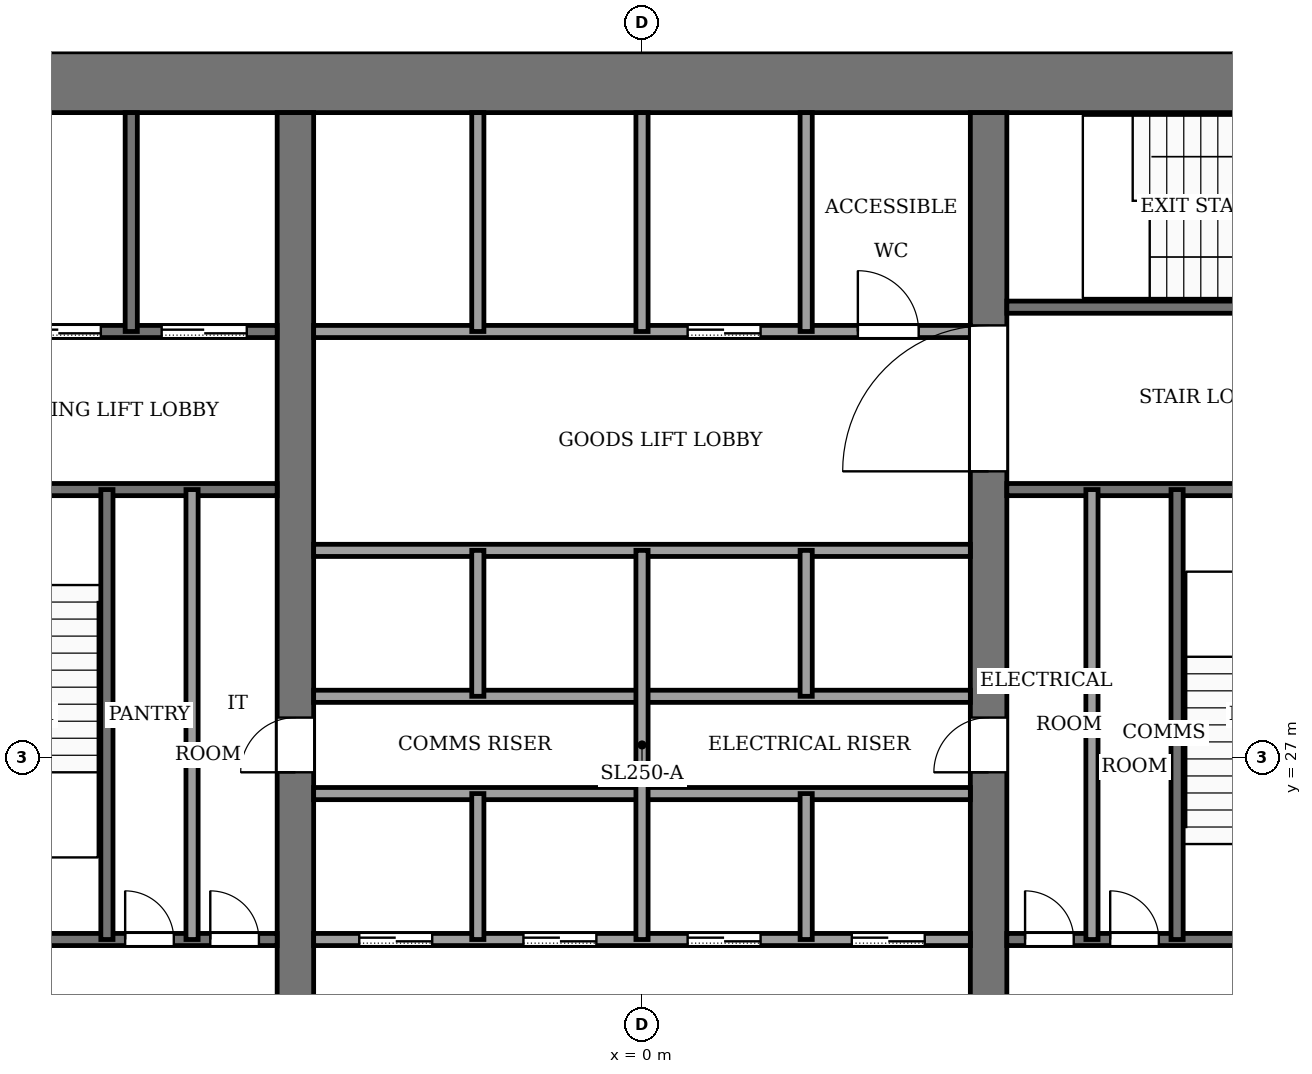
"""IFC4 building model, lengths in metres.
Left out: names, types, materials, properties, quantities, classifications, styles, units other than length and angle.
Written with IfcOpenShell. Run it as: python <this file> out.ifc"""

import sys

from ifc_helpers import new_model, si_unit, direction, frame, frame_2d, origin, place, context, subcontext, project, spatial, rectangle, extrude, element, fill, save


model = new_model("IFC4")
c1 = context("Model", 3, precision=1e-05, world=origin(), true_north=direction((0.0, 1.0)))
c2 = subcontext(c1, "Body", "Model", "MODEL_VIEW")
j1 = project(units=[si_unit("LENGTHUNIT", "METRE"), si_unit("PLANEANGLEUNIT", "RADIAN")], contexts=[c1])
p1 = place(None, origin())
s1 = spatial("IfcSite", under=j1, at=p1, CompositionType="ELEMENT")
p2 = place(p1, origin())
s2 = spatial("IfcBuilding", under=s1, at=p2, CompositionType="ELEMENT")
p3 = place(p2, frame((0.0, 0.0, 150.0)))
s3 = spatial("IfcBuildingStorey", under=s2, at=p3, CompositionType="ELEMENT", Elevation=150.0)
p4 = place(p3, frame((-13.6, 38.1, -0.13), z_axis=(0.0, 0.0, 1.0), x_axis=(1.0, 0.0, 0.0)))
e1 = element("IfcWall", 1, at=p4, inside=s3, PredefinedType="SHEAR", context=c2, shape_type="SweptSolid", body=[
    extrude(rectangle(XDim=27.2, YDim=1.0, at=frame_2d((13.6, 0.0))), origin(), (0.0, 0.0, 1.0), 4.0),
])
p5 = place(p3, frame((-5.7, 18.4, -0.13), z_axis=(0.0, 0.0, 1.0), x_axis=(0.0, 1.0, 0.0)))
e2 = element("IfcWall", 2, at=p5, inside=s3, PredefinedType="SHEAR", context=c2, shape_type="SweptSolid", body=[
    extrude(rectangle(XDim=19.2, YDim=0.6, at=frame_2d((9.6, 0.0))), origin(), (0.0, 0.0, 1.0), 4.0),
])
p6 = place(p5, frame((8.35, 0.0, 0.13)))
e3 = element("IfcOpeningElement", 3, at=p6, cuts=e2, PredefinedType="OPENING", context=c2, shape_type="SweptSolid", body=[
    extrude(rectangle(XDim=0.9, YDim=2.1, at=frame_2d((0.45, 1.05))), frame((0.0, 0.31, 0.0), z_axis=(0.0, -1.0, 0.0), x_axis=(1.0, 0.0, 0.0)), (0.0, 0.0, 1.0), 0.62),
])
p7 = place(p3, frame((5.7, 18.4, -0.13), z_axis=(0.0, 0.0, 1.0), x_axis=(0.0, 1.0, 0.0)))
e4 = element("IfcWall", 4, at=p7, inside=s3, PredefinedType="SHEAR", context=c2, shape_type="SweptSolid", body=[
    extrude(rectangle(XDim=19.2, YDim=0.6, at=frame_2d((9.6, 0.0))), origin(), (0.0, 0.0, 1.0), 4.0),
])
p8 = place(p7, frame((8.35, 0.0, 0.13)))
e5 = element("IfcOpeningElement", 5, at=p8, cuts=e4, PredefinedType="OPENING", context=c2, shape_type="SweptSolid", body=[
    extrude(rectangle(XDim=0.9, YDim=2.1, at=frame_2d((0.45, 1.05))), frame((0.0, 0.31, 0.0), z_axis=(0.0, -1.0, 0.0), x_axis=(1.0, 0.0, 0.0)), (0.0, 0.0, 1.0), 0.62),
])
p9 = place(p7, frame((13.3, 0.0, 0.13)))
e6 = element("IfcOpeningElement", 6, at=p9, cuts=e4, PredefinedType="OPENING", context=c2, shape_type="SweptSolid", body=[
    extrude(rectangle(XDim=2.4, YDim=2.4, at=frame_2d((1.2, 1.2))), frame((0.0, 0.31, 0.0), z_axis=(0.0, -1.0, 0.0), x_axis=(1.0, 0.0, 0.0)), (0.0, 0.0, 1.0), 0.62),
])
p10 = place(p3, frame((-12.6, 24.0, 0.0), z_axis=(0.0, 0.0, 1.0), x_axis=(1.0, 0.0, 0.0)))
e7 = element("IfcWall", 7, at=p10, inside=s3, PredefinedType="PARTITIONING", context=c2, shape_type="SweptSolid", body=[
    extrude(rectangle(XDim=6.6, YDim=0.2, at=frame_2d((3.3, 0.0))), origin(), (0.0, 0.0, 1.0), 3.87),
])
p11 = place(p10, frame((4.1, 0.0, 0.0)))
e8 = element("IfcOpeningElement", 8, at=p11, cuts=e7, PredefinedType="OPENING", context=c2, shape_type="SweptSolid", body=[
    extrude(rectangle(XDim=0.8, YDim=2.1, at=frame_2d((0.4, 1.05))), frame((0.0, 0.11, 0.0), z_axis=(0.0, -1.0, 0.0), x_axis=(1.0, 0.0, 0.0)), (0.0, 0.0, 1.0), 0.22),
])
p12 = place(p10, frame((5.5, 0.0, 0.0)))
e9 = element("IfcOpeningElement", 9, at=p12, cuts=e7, PredefinedType="OPENING", context=c2, shape_type="SweptSolid", body=[
    extrude(rectangle(XDim=0.8, YDim=2.1, at=frame_2d((0.4, 1.05))), frame((0.0, 0.11, 0.0), z_axis=(0.0, -1.0, 0.0), x_axis=(1.0, 0.0, 0.0)), (0.0, 0.0, 1.0), 0.22),
])
p13 = place(p3, frame((-5.4, 24.0, 0.0), z_axis=(0.0, 0.0, 1.0), x_axis=(1.0, 0.0, 0.0)))
e10 = element("IfcWall", 10, at=p13, inside=s3, PredefinedType="PARTITIONING", context=c2, shape_type="SweptSolid", body=[
    extrude(rectangle(XDim=10.8, YDim=0.2, at=frame_2d((5.4, 0.0))), origin(), (0.0, 0.0, 1.0), 3.87),
])
p14 = place(p13, frame((0.75, 0.0, 0.0)))
e11 = element("IfcOpeningElement", 11, at=p14, cuts=e10, PredefinedType="OPENING", context=c2, shape_type="SweptSolid", body=[
    extrude(rectangle(XDim=1.2, YDim=2.2, at=frame_2d((0.6, 1.1))), frame((0.0, 0.11, 0.0), z_axis=(0.0, -1.0, 0.0), x_axis=(1.0, 0.0, 0.0)), (0.0, 0.0, 1.0), 0.22),
])
p15 = place(p13, frame((3.45, 0.0, 0.0)))
e12 = element("IfcOpeningElement", 12, at=p15, cuts=e10, PredefinedType="OPENING", context=c2, shape_type="SweptSolid", body=[
    extrude(rectangle(XDim=1.2, YDim=2.2, at=frame_2d((0.6, 1.1))), frame((0.0, 0.11, 0.0), z_axis=(0.0, -1.0, 0.0), x_axis=(1.0, 0.0, 0.0)), (0.0, 0.0, 1.0), 0.22),
])
p16 = place(p13, frame((6.15, 0.0, 0.0)))
e13 = element("IfcOpeningElement", 13, at=p16, cuts=e10, PredefinedType="OPENING", context=c2, shape_type="SweptSolid", body=[
    extrude(rectangle(XDim=1.2, YDim=2.2, at=frame_2d((0.6, 1.1))), frame((0.0, 0.11, 0.0), z_axis=(0.0, -1.0, 0.0), x_axis=(1.0, 0.0, 0.0)), (0.0, 0.0, 1.0), 0.22),
])
p17 = place(p13, frame((8.85, 0.0, 0.0)))
e14 = element("IfcOpeningElement", 14, at=p17, cuts=e10, PredefinedType="OPENING", context=c2, shape_type="SweptSolid", body=[
    extrude(rectangle(XDim=1.2, YDim=2.2, at=frame_2d((0.6, 1.1))), frame((0.0, 0.11, 0.0), z_axis=(0.0, -1.0, 0.0), x_axis=(1.0, 0.0, 0.0)), (0.0, 0.0, 1.0), 0.22),
])
p18 = place(p3, frame((6.0, 24.0, 0.0), z_axis=(0.0, 0.0, 1.0), x_axis=(1.0, 0.0, 0.0)))
e15 = element("IfcWall", 15, at=p18, inside=s3, PredefinedType="PARTITIONING", context=c2, shape_type="SweptSolid", body=[
    extrude(rectangle(XDim=6.6, YDim=0.2, at=frame_2d((3.3, 0.0))), origin(), (0.0, 0.0, 1.0), 3.87),
])
p19 = place(p18, frame((0.3, 0.0, 0.0)))
e16 = element("IfcOpeningElement", 16, at=p19, cuts=e15, PredefinedType="OPENING", context=c2, shape_type="SweptSolid", body=[
    extrude(rectangle(XDim=0.8, YDim=2.1, at=frame_2d((0.4, 1.05))), frame((0.0, 0.11, 0.0), z_axis=(0.0, -1.0, 0.0), x_axis=(1.0, 0.0, 0.0)), (0.0, 0.0, 1.0), 0.22),
])
p20 = place(p18, frame((1.7, 0.0, 0.0)))
e17 = element("IfcOpeningElement", 17, at=p20, cuts=e15, PredefinedType="OPENING", context=c2, shape_type="SweptSolid", body=[
    extrude(rectangle(XDim=0.8, YDim=2.1, at=frame_2d((0.4, 1.05))), frame((0.0, 0.11, 0.0), z_axis=(0.0, -1.0, 0.0), x_axis=(1.0, 0.0, 0.0)), (0.0, 0.0, 1.0), 0.22),
])
p21 = place(p18, frame((4.4, 0.0, 0.0)))
e18 = element("IfcOpeningElement", 18, at=p21, cuts=e15, PredefinedType="OPENING", context=c2, shape_type="SweptSolid", body=[
    extrude(rectangle(XDim=1.2, YDim=2.2, at=frame_2d((0.6, 1.1))), frame((0.0, 0.11, 0.0), z_axis=(0.0, -1.0, 0.0), x_axis=(1.0, 0.0, 0.0)), (0.0, 0.0, 1.0), 0.22),
])
for number, where, z_axis, x_axis in (
    (19, (-5.4, 26.4, 0.0), (0.0, 0.0, 1.0), (1.0, 0.0, 0.0)),
    (20, (-5.4, 28.0, 0.0), (0.0, 0.0, 1.0), (1.0, 0.0, 0.0)),
    (21, (-5.4, 30.4, 0.0), (0.0, 0.0, 1.0), (1.0, 0.0, 0.0)),
):
    element("IfcWall", number, at=place(p3, frame(where, z_axis=z_axis, x_axis=x_axis)), inside=s3, PredefinedType="PARTITIONING", context=c2, shape_type="SweptSolid", body=[
        extrude(rectangle(XDim=10.8, YDim=0.2, at=frame_2d((5.4, 0.0))), origin(), (0.0, 0.0, 1.0), 3.87),
    ])
p22 = place(p3, frame((-12.6, 31.4, 0.0), z_axis=(0.0, 0.0, 1.0), x_axis=(1.0, 0.0, 0.0)))
e22 = element("IfcWall", 22, at=p22, inside=s3, PredefinedType="PARTITIONING", context=c2, shape_type="SweptSolid", body=[
    extrude(rectangle(XDim=6.6, YDim=0.2, at=frame_2d((3.3, 0.0))), origin(), (0.0, 0.0, 1.0), 3.87),
])
p23 = place(p22, frame((1.0, 0.0, 0.0)))
e23 = element("IfcOpeningElement", 23, at=p23, cuts=e22, PredefinedType="OPENING", context=c2, shape_type="SweptSolid", body=[
    extrude(rectangle(XDim=1.2, YDim=2.2, at=frame_2d((0.6, 1.1))), frame((0.0, 0.11, 0.0), z_axis=(0.0, -1.0, 0.0), x_axis=(1.0, 0.0, 0.0)), (0.0, 0.0, 1.0), 0.22),
])
p24 = place(p3, frame((6.0, 31.4, 0.0), z_axis=(0.0, 0.0, 1.0), x_axis=(1.0, 0.0, 0.0)))
e24 = element("IfcWall", 24, at=p24, inside=s3, PredefinedType="PARTITIONING", context=c2, shape_type="SweptSolid", body=[
    extrude(rectangle(XDim=6.6, YDim=0.2, at=frame_2d((3.3, 0.0))), origin(), (0.0, 0.0, 1.0), 3.87),
])
p25 = place(p3, frame((-12.6, 34.0, 0.0), z_axis=(0.0, 0.0, 1.0), x_axis=(1.0, 0.0, 0.0)))
e25 = element("IfcWall", 25, at=p25, inside=s3, PredefinedType="PARTITIONING", context=c2, shape_type="SweptSolid", body=[
    extrude(rectangle(XDim=6.6, YDim=0.2, at=frame_2d((3.3, 0.0))), origin(), (0.0, 0.0, 1.0), 3.87),
])
p26 = place(p25, frame((4.7, 0.0, 0.0)))
e26 = element("IfcOpeningElement", 26, at=p26, cuts=e25, PredefinedType="OPENING", context=c2, shape_type="SweptSolid", body=[
    extrude(rectangle(XDim=1.4, YDim=2.2, at=frame_2d((0.7, 1.1))), frame((0.0, 0.11, 0.0), z_axis=(0.0, -1.0, 0.0), x_axis=(1.0, 0.0, 0.0)), (0.0, 0.0, 1.0), 0.22),
])
p27 = place(p25, frame((2.3, 0.0, 0.0)))
e27 = element("IfcOpeningElement", 27, at=p27, cuts=e25, PredefinedType="OPENING", context=c2, shape_type="SweptSolid", body=[
    extrude(rectangle(XDim=1.4, YDim=2.2, at=frame_2d((0.7, 1.1))), frame((0.0, 0.11, 0.0), z_axis=(0.0, -1.0, 0.0), x_axis=(1.0, 0.0, 0.0)), (0.0, 0.0, 1.0), 0.22),
])
p28 = place(p25, frame((0.45, 0.0, 0.0)))
e28 = element("IfcOpeningElement", 28, at=p28, cuts=e25, PredefinedType="OPENING", context=c2, shape_type="SweptSolid", body=[
    extrude(rectangle(XDim=0.9, YDim=2.1, at=frame_2d((0.45, 1.05))), frame((0.0, 0.11, 0.0), z_axis=(0.0, -1.0, 0.0), x_axis=(1.0, 0.0, 0.0)), (0.0, 0.0, 1.0), 0.22),
])
p29 = place(p3, frame((-5.4, 34.0, 0.0), z_axis=(0.0, 0.0, 1.0), x_axis=(1.0, 0.0, 0.0)))
e29 = element("IfcWall", 29, at=p29, inside=s3, PredefinedType="PARTITIONING", context=c2, shape_type="SweptSolid", body=[
    extrude(rectangle(XDim=10.8, YDim=0.2, at=frame_2d((5.4, 0.0))), origin(), (0.0, 0.0, 1.0), 3.87),
])
p30 = place(p29, frame((6.15, 0.0, 0.0)))
e30 = element("IfcOpeningElement", 30, at=p30, cuts=e29, PredefinedType="OPENING", context=c2, shape_type="SweptSolid", body=[
    extrude(rectangle(XDim=1.2, YDim=2.2, at=frame_2d((0.6, 1.1))), frame((0.0, 0.11, 0.0), z_axis=(0.0, -1.0, 0.0), x_axis=(1.0, 0.0, 0.0)), (0.0, 0.0, 1.0), 0.22),
])
p31 = place(p29, frame((8.95, 0.0, 0.0)))
e31 = element("IfcOpeningElement", 31, at=p31, cuts=e29, PredefinedType="OPENING", context=c2, shape_type="SweptSolid", body=[
    extrude(rectangle(XDim=1.0, YDim=2.1, at=frame_2d((0.5, 1.05))), frame((0.0, 0.11, 0.0), z_axis=(0.0, -1.0, 0.0), x_axis=(1.0, 0.0, 0.0)), (0.0, 0.0, 1.0), 0.22),
])
p32 = place(p3, frame((6.0, 34.4, 0.0), z_axis=(0.0, 0.0, 1.0), x_axis=(1.0, 0.0, 0.0)))
e32 = element("IfcWall", 32, at=p32, inside=s3, PredefinedType="PARTITIONING", context=c2, shape_type="SweptSolid", body=[
    extrude(rectangle(XDim=6.6, YDim=0.2, at=frame_2d((3.3, 0.0))), origin(), (0.0, 0.0, 1.0), 3.87),
])
p33 = place(p32, frame((4.8, 0.0, 0.0)))
e33 = element("IfcOpeningElement", 33, at=p33, cuts=e32, PredefinedType="OPENING", context=c2, shape_type="SweptSolid", body=[
    extrude(rectangle(XDim=1.2, YDim=2.2, at=frame_2d((0.6, 1.1))), frame((0.0, 0.11, 0.0), z_axis=(0.0, -1.0, 0.0), x_axis=(1.0, 0.0, 0.0)), (0.0, 0.0, 1.0), 0.22),
])
p34 = place(p3, frame((-8.8, 24.0, 0.0), z_axis=(0.0, 0.0, 1.0), x_axis=(0.0, 1.0, 0.0)))
e34 = element("IfcWall", 34, at=p34, inside=s3, PredefinedType="PARTITIONING", context=c2, shape_type="SweptSolid", body=[
    extrude(rectangle(XDim=7.4, YDim=0.2, at=frame_2d((3.7, 0.0))), origin(), (0.0, 0.0, 1.0), 3.87),
])
p35 = place(p3, frame((-8.4, 34.0, 0.0), z_axis=(0.0, 0.0, 1.0), x_axis=(0.0, 1.0, 0.0)))
e35 = element("IfcWall", 35, at=p35, inside=s3, PredefinedType="PARTITIONING", context=c2, shape_type="SweptSolid", body=[
    extrude(rectangle(XDim=3.6, YDim=0.2, at=frame_2d((1.8, 0.0))), origin(), (0.0, 0.0, 1.0), 3.87),
])
p36 = place(p3, frame((-7.4, 24.0, 0.0), z_axis=(0.0, 0.0, 1.0), x_axis=(0.0, 1.0, 0.0)))
e36 = element("IfcWall", 36, at=p36, inside=s3, PredefinedType="PARTITIONING", context=c2, shape_type="SweptSolid", body=[
    extrude(rectangle(XDim=7.4, YDim=0.2, at=frame_2d((3.7, 0.0))), origin(), (0.0, 0.0, 1.0), 3.87),
])
for number, where, z_axis, x_axis in (
    (37, (-2.7, 24.0, 0.0), (0.0, 0.0, 1.0), (0.0, 1.0, 0.0)),
    (38, (-2.7, 28.0, 0.0), (0.0, 0.0, 1.0), (0.0, 1.0, 0.0)),
):
    element("IfcWall", number, at=place(p3, frame(where, z_axis=z_axis, x_axis=x_axis)), inside=s3, PredefinedType="PARTITIONING", context=c2, shape_type="SweptSolid", body=[
        extrude(rectangle(XDim=2.4, YDim=0.2, at=frame_2d((1.2, 0.0))), origin(), (0.0, 0.0, 1.0), 3.87),
    ])
p37 = place(p3, frame((-2.7, 34.0, 0.0), z_axis=(0.0, 0.0, 1.0), x_axis=(0.0, 1.0, 0.0)))
e39 = element("IfcWall", 39, at=p37, inside=s3, PredefinedType="PARTITIONING", context=c2, shape_type="SweptSolid", body=[
    extrude(rectangle(XDim=3.6, YDim=0.2, at=frame_2d((1.8, 0.0))), origin(), (0.0, 0.0, 1.0), 3.87),
])
p38 = place(p3, frame((0.0, 24.0, 0.0), z_axis=(0.0, 0.0, 1.0), x_axis=(0.0, 1.0, 0.0)))
e40 = element("IfcWall", 40, at=p38, inside=s3, PredefinedType="PARTITIONING", context=c2, shape_type="SweptSolid", body=[
    extrude(rectangle(XDim=6.4, YDim=0.2, at=frame_2d((3.2, 0.0))), origin(), (0.0, 0.0, 1.0), 3.87),
])
p39 = place(p3, frame((0.0, 34.0, 0.0), z_axis=(0.0, 0.0, 1.0), x_axis=(0.0, 1.0, 0.0)))
e41 = element("IfcWall", 41, at=p39, inside=s3, PredefinedType="PARTITIONING", context=c2, shape_type="SweptSolid", body=[
    extrude(rectangle(XDim=3.6, YDim=0.2, at=frame_2d((1.8, 0.0))), origin(), (0.0, 0.0, 1.0), 3.87),
])
for number, where, z_axis, x_axis in (
    (42, (2.7, 24.0, 0.0), (0.0, 0.0, 1.0), (0.0, 1.0, 0.0)),
    (43, (2.7, 28.0, 0.0), (0.0, 0.0, 1.0), (0.0, 1.0, 0.0)),
):
    element("IfcWall", number, at=place(p3, frame(where, z_axis=z_axis, x_axis=x_axis)), inside=s3, PredefinedType="PARTITIONING", context=c2, shape_type="SweptSolid", body=[
        extrude(rectangle(XDim=2.4, YDim=0.2, at=frame_2d((1.2, 0.0))), origin(), (0.0, 0.0, 1.0), 3.87),
    ])
p40 = place(p3, frame((2.7, 34.0, 0.0), z_axis=(0.0, 0.0, 1.0), x_axis=(0.0, 1.0, 0.0)))
e44 = element("IfcWall", 44, at=p40, inside=s3, PredefinedType="PARTITIONING", context=c2, shape_type="SweptSolid", body=[
    extrude(rectangle(XDim=3.6, YDim=0.2, at=frame_2d((1.8, 0.0))), origin(), (0.0, 0.0, 1.0), 3.87),
])
for number, where, z_axis, x_axis in (
    (45, (7.4, 24.0, 0.0), (0.0, 0.0, 1.0), (0.0, 1.0, 0.0)),
    (46, (8.8, 24.0, 0.0), (0.0, 0.0, 1.0), (0.0, 1.0, 0.0)),
):
    element("IfcWall", number, at=place(p3, frame(where, z_axis=z_axis, x_axis=x_axis)), inside=s3, PredefinedType="PARTITIONING", context=c2, shape_type="SweptSolid", body=[
        extrude(rectangle(XDim=7.4, YDim=0.2, at=frame_2d((3.7, 0.0))), origin(), (0.0, 0.0, 1.0), 3.87),
    ])
p41 = place(p14, origin())
e47 = element("IfcDoor", 47, at=p41, inside=s3, OperationType="SLIDING_TO_LEFT", PredefinedType="DOOR", context=c2, shape_type="SweptSolid", body=[
    extrude(rectangle(XDim=1.2, YDim=2.2, at=frame_2d((0.6, 1.1))), frame((0.0, 0.025, 0.0), z_axis=(0.0, -1.0, 0.0), x_axis=(1.0, 0.0, 0.0)), (0.0, 0.0, 1.0), 0.05),
])
fill(e11, e47)
p42 = place(p15, origin())
e48 = element("IfcDoor", 48, at=p42, inside=s3, OperationType="SLIDING_TO_LEFT", PredefinedType="DOOR", context=c2, shape_type="SweptSolid", body=[
    extrude(rectangle(XDim=1.2, YDim=2.2, at=frame_2d((0.6, 1.1))), frame((0.0, 0.025, 0.0), z_axis=(0.0, -1.0, 0.0), x_axis=(1.0, 0.0, 0.0)), (0.0, 0.0, 1.0), 0.05),
])
fill(e12, e48)
p43 = place(p16, origin())
e49 = element("IfcDoor", 49, at=p43, inside=s3, OperationType="SLIDING_TO_LEFT", PredefinedType="DOOR", context=c2, shape_type="SweptSolid", body=[
    extrude(rectangle(XDim=1.2, YDim=2.2, at=frame_2d((0.6, 1.1))), frame((0.0, 0.025, 0.0), z_axis=(0.0, -1.0, 0.0), x_axis=(1.0, 0.0, 0.0)), (0.0, 0.0, 1.0), 0.05),
])
fill(e13, e49)
p44 = place(p17, origin())
e50 = element("IfcDoor", 50, at=p44, inside=s3, OperationType="SLIDING_TO_LEFT", PredefinedType="DOOR", context=c2, shape_type="SweptSolid", body=[
    extrude(rectangle(XDim=1.2, YDim=2.2, at=frame_2d((0.6, 1.1))), frame((0.0, 0.025, 0.0), z_axis=(0.0, -1.0, 0.0), x_axis=(1.0, 0.0, 0.0)), (0.0, 0.0, 1.0), 0.05),
])
fill(e14, e50)
p45 = place(p30, origin())
e51 = element("IfcDoor", 51, at=p45, inside=s3, OperationType="SLIDING_TO_LEFT", PredefinedType="DOOR", context=c2, shape_type="SweptSolid", body=[
    extrude(rectangle(XDim=1.2, YDim=2.2, at=frame_2d((0.6, 1.1))), frame((0.0, 0.025, 0.0), z_axis=(0.0, -1.0, 0.0), x_axis=(1.0, 0.0, 0.0)), (0.0, 0.0, 1.0), 0.05),
])
fill(e30, e51)
p46 = place(p26, origin())
e52 = element("IfcDoor", 52, at=p46, inside=s3, OperationType="SLIDING_TO_LEFT", PredefinedType="DOOR", context=c2, shape_type="SweptSolid", body=[
    extrude(rectangle(XDim=1.4, YDim=2.2, at=frame_2d((0.7, 1.1))), frame((0.0, 0.025, 0.0), z_axis=(0.0, -1.0, 0.0), x_axis=(1.0, 0.0, 0.0)), (0.0, 0.0, 1.0), 0.05),
])
fill(e26, e52)
p47 = place(p27, origin())
e53 = element("IfcDoor", 53, at=p47, inside=s3, OperationType="SLIDING_TO_LEFT", PredefinedType="DOOR", context=c2, shape_type="SweptSolid", body=[
    extrude(rectangle(XDim=1.4, YDim=2.2, at=frame_2d((0.7, 1.1))), frame((0.0, 0.025, 0.0), z_axis=(0.0, -1.0, 0.0), x_axis=(1.0, 0.0, 0.0)), (0.0, 0.0, 1.0), 0.05),
])
fill(e27, e53)
p48 = place(p11, origin())
e54 = element("IfcDoor", 54, at=p48, inside=s3, OperationType="SINGLE_SWING_RIGHT", PredefinedType="DOOR", context=c2, shape_type="SweptSolid", body=[
    extrude(rectangle(XDim=0.8, YDim=2.1, at=frame_2d((0.4, 1.05))), frame((0.0, 0.025, 0.0), z_axis=(0.0, -1.0, 0.0), x_axis=(1.0, 0.0, 0.0)), (0.0, 0.0, 1.0), 0.05),
])
fill(e8, e54)
p49 = place(p12, origin())
e55 = element("IfcDoor", 55, at=p49, inside=s3, OperationType="SINGLE_SWING_LEFT", PredefinedType="DOOR", context=c2, shape_type="SweptSolid", body=[
    extrude(rectangle(XDim=0.8, YDim=2.1, at=frame_2d((0.4, 1.05))), frame((0.0, 0.025, 0.0), z_axis=(0.0, -1.0, 0.0), x_axis=(1.0, 0.0, 0.0)), (0.0, 0.0, 1.0), 0.05),
])
fill(e9, e55)
p50 = place(p19, origin())
e56 = element("IfcDoor", 56, at=p50, inside=s3, OperationType="SINGLE_SWING_RIGHT", PredefinedType="DOOR", context=c2, shape_type="SweptSolid", body=[
    extrude(rectangle(XDim=0.8, YDim=2.1, at=frame_2d((0.4, 1.05))), frame((0.0, 0.025, 0.0), z_axis=(0.0, -1.0, 0.0), x_axis=(1.0, 0.0, 0.0)), (0.0, 0.0, 1.0), 0.05),
])
fill(e16, e56)
p51 = place(p20, origin())
e57 = element("IfcDoor", 57, at=p51, inside=s3, OperationType="SINGLE_SWING_LEFT", PredefinedType="DOOR", context=c2, shape_type="SweptSolid", body=[
    extrude(rectangle(XDim=0.8, YDim=2.1, at=frame_2d((0.4, 1.05))), frame((0.0, 0.025, 0.0), z_axis=(0.0, -1.0, 0.0), x_axis=(1.0, 0.0, 0.0)), (0.0, 0.0, 1.0), 0.05),
])
fill(e17, e57)
p52 = place(p31, origin())
e58 = element("IfcDoor", 58, at=p52, inside=s3, OperationType="SINGLE_SWING_LEFT", PredefinedType="DOOR", context=c2, shape_type="SweptSolid", body=[
    extrude(rectangle(XDim=1.0, YDim=2.1, at=frame_2d((0.5, 1.05))), frame((0.0, 0.025, 0.0), z_axis=(0.0, -1.0, 0.0), x_axis=(1.0, 0.0, 0.0)), (0.0, 0.0, 1.0), 0.05),
])
fill(e31, e58)
p53 = place(p6, origin())
e59 = element("IfcDoor", 59, at=p53, inside=s3, OperationType="SINGLE_SWING_LEFT", PredefinedType="DOOR", context=c2, shape_type="SweptSolid", body=[
    extrude(rectangle(XDim=0.9, YDim=2.1, at=frame_2d((0.45, 1.05))), frame((0.0, 0.025, 0.0), z_axis=(0.0, -1.0, 0.0), x_axis=(1.0, 0.0, 0.0)), (0.0, 0.0, 1.0), 0.05),
])
fill(e3, e59)
p54 = place(p8, origin())
e60 = element("IfcDoor", 60, at=p54, inside=s3, OperationType="SINGLE_SWING_RIGHT", PredefinedType="DOOR", context=c2, shape_type="SweptSolid", body=[
    extrude(rectangle(XDim=0.9, YDim=2.1, at=frame_2d((0.45, 1.05))), frame((0.0, 0.025, 0.0), z_axis=(0.0, -1.0, 0.0), x_axis=(1.0, 0.0, 0.0)), (0.0, 0.0, 1.0), 0.05),
])
fill(e5, e60)
p55 = place(p9, origin())
e61 = element("IfcDoor", 61, at=p55, inside=s3, OperationType="DOUBLE_DOOR_SINGLE_SWING", PredefinedType="DOOR", context=c2, shape_type="SweptSolid", body=[
    extrude(rectangle(XDim=2.4, YDim=2.4, at=frame_2d((1.2, 1.2))), frame((0.0, 0.025, 0.0), z_axis=(0.0, -1.0, 0.0), x_axis=(1.0, 0.0, 0.0)), (0.0, 0.0, 1.0), 0.05),
])
fill(e6, e61)
save(model, sys.argv[1])
